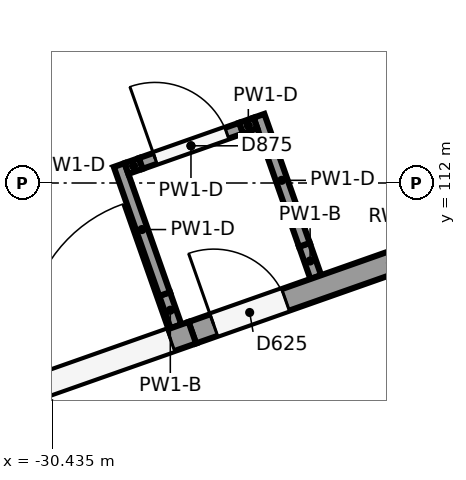
"""IFC4 building model, lengths in metres.
Left out: names, types, materials, properties, quantities, classifications, styles, units other than length and angle.
Written with IfcOpenShell. Run it as: python <this file> out.ifc"""

import sys

from ifc_helpers import new_model, si_unit, direction, frame, frame_2d, origin, place, context, subcontext, project, spatial, rectangle, extrude, element, fill, save


model = new_model("IFC4")
c1 = context("Model", 3, precision=1e-05, world=origin(), true_north=direction((0.0, 1.0)))
c2 = subcontext(c1, "Body", "Model", "MODEL_VIEW")
j1 = project(units=[si_unit("LENGTHUNIT", "METRE"), si_unit("PLANEANGLEUNIT", "RADIAN")], contexts=[c1])
p1 = place(None, origin())
s1 = spatial("IfcSite", under=j1, at=p1, CompositionType="ELEMENT")
p2 = place(p1, origin())
s2 = spatial("IfcBuilding", under=s1, at=p2, CompositionType="ELEMENT")
p3 = place(p2, origin())
s3 = spatial("IfcBuildingStorey", under=s2, at=p3, CompositionType="ELEMENT", Elevation=0.0)
p4 = place(p3, frame((-32.742, 108.569, 0.0), z_axis=(0.0, 0.0, 1.0), x_axis=(0.943210364758, 0.332196038226, 0.0)))
e1 = element("IfcWall", 1, at=p4, inside=s3, PredefinedType="SOLIDWALL", context=c2, shape_type="SweptSolid", body=[
    extrude(rectangle(XDim=4.4, YDim=0.3, at=frame_2d((2.2, 0.0))), origin(), (0.0, 0.0, 1.0), 4.85),
])
p5 = place(p4, frame((0.3, 0.0, 0.0)))
e2 = element("IfcOpeningElement", 2, at=p5, cuts=e1, PredefinedType="OPENING", context=c2, shape_type="SweptSolid", body=[
    extrude(rectangle(XDim=3.8, YDim=2.8, at=frame_2d((1.9, 1.4))), frame((0.0, 0.16, 0.0), z_axis=(0.0, -1.0, 0.0), x_axis=(1.0, 0.0, 0.0)), (0.0, 0.0, 1.0), 0.32),
])
p6 = place(p3, frame((-28.592, 110.031, 0.0), z_axis=(0.0, 0.0, 1.0), x_axis=(0.943213513301, 0.332187098373, 0.0)))
e3 = element("IfcWall", 3, at=p6, inside=s3, PredefinedType="SOLIDWALL", context=c2, shape_type="SweptSolid", body=[
    extrude(rectangle(XDim=5.528, YDim=0.3, at=frame_2d((2.764, 0.0))), origin(), (0.0, 0.0, 1.0), 4.85),
])
p7 = place(p6, frame((0.3, 0.0, 0.0)))
e4 = element("IfcOpeningElement", 4, at=p7, cuts=e3, PredefinedType="OPENING", context=c2, shape_type="SweptSolid", body=[
    extrude(rectangle(XDim=1.0, YDim=2.1, at=frame_2d((0.5, 1.05))), frame((0.0, 0.16, 0.0), z_axis=(0.0, -1.0, 0.0), x_axis=(1.0, 0.0, 0.0)), (0.0, 0.0, 1.0), 0.32),
])
p8 = place(p3, frame((-28.806, 110.114, 0.0), z_axis=(0.0, 0.0, 1.0), x_axis=(-0.332621430713, 0.943060434877, 0.0)))
e5 = element("IfcWall", 5, at=p8, inside=s3, PredefinedType="PARTITIONING", context=c2, shape_type="SweptSolid", body=[
    extrude(rectangle(XDim=0.45, YDim=0.15, at=frame_2d((0.225, 0.0))), origin(), (0.0, 0.0, 1.0), 4.85),
])
p9 = place(p3, frame((-28.956, 110.539, 0.0), z_axis=(0.0, 0.0, 1.0), x_axis=(-0.332174408782, 0.943217982308, 0.0)))
e6 = element("IfcWall", 6, at=p9, inside=s3, PredefinedType="PARTITIONING", context=c2, shape_type="SweptSolid", body=[
    extrude(rectangle(XDim=1.8, YDim=0.15, at=frame_2d((0.9, 0.0))), origin(), (0.0, 0.0, 1.0), 6.1),
])
p10 = place(p3, frame((-26.967, 110.762, 0.0), z_axis=(0.0, 0.0, 1.0), x_axis=(-0.332138720672, 0.943230549882, 0.0)))
e7 = element("IfcWall", 7, at=p10, inside=s3, PredefinedType="PARTITIONING", context=c2, shape_type="SweptSolid", body=[
    extrude(rectangle(XDim=0.45, YDim=0.15, at=frame_2d((0.225, 0.0))), origin(), (0.0, 0.0, 1.0), 4.85),
])
p11 = place(p3, frame((-27.117, 111.186, 0.0), z_axis=(0.0, 0.0, 1.0), x_axis=(-0.332174408782, 0.943217982308, 0.0)))
e8 = element("IfcWall", 8, at=p11, inside=s3, PredefinedType="PARTITIONING", context=c2, shape_type="SweptSolid", body=[
    extrude(rectangle(XDim=1.8, YDim=0.15, at=frame_2d((0.9, 0.0))), origin(), (0.0, 0.0, 1.0), 6.1),
])
p12 = place(p3, frame((-29.458, 112.191, 0.0), z_axis=(0.0, 0.0, 1.0), x_axis=(0.94330531524, 0.331926320498, 0.0)))
e9 = element("IfcWall", 9, at=p12, inside=s3, PredefinedType="PARTITIONING", context=c2, shape_type="SweptSolid", body=[
    extrude(rectangle(XDim=0.2, YDim=0.15, at=frame_2d((0.1, 0.0))), origin(), (0.0, 0.0, 1.0), 6.1),
])
p13 = place(p3, frame((-29.27, 112.257, 0.0), z_axis=(0.0, 0.0, 1.0), x_axis=(0.943247651759, 0.332090149584, 0.0)))
e10 = element("IfcWall", 10, at=p13, inside=s3, PredefinedType="PARTITIONING", context=c2, shape_type="SweptSolid", body=[
    extrude(rectangle(XDim=1.4, YDim=0.15, at=frame_2d((0.7, 0.0))), origin(), (0.0, 0.0, 1.0), 6.1),
])
p14 = place(p13, frame((0.2, 0.0, 0.0)))
e11 = element("IfcOpeningElement", 11, at=p14, cuts=e10, PredefinedType="OPENING", context=c2, shape_type="SweptSolid", body=[
    extrude(rectangle(XDim=1.0, YDim=2.1, at=frame_2d((0.5, 1.05))), frame((0.0, 0.085, 0.0), z_axis=(0.0, -1.0, 0.0), x_axis=(1.0, 0.0, 0.0)), (0.0, 0.0, 1.0), 0.17),
])
p15 = place(p3, frame((-27.949, 112.722, 0.0), z_axis=(0.0, 0.0, 1.0), x_axis=(0.942922754758, 0.333011529171, 0.0)))
e12 = element("IfcWall", 12, at=p15, inside=s3, PredefinedType="PARTITIONING", context=c2, shape_type="SweptSolid", body=[
    extrude(rectangle(XDim=0.2, YDim=0.15, at=frame_2d((0.1, 0.0))), origin(), (0.0, 0.0, 1.0), 6.1),
])
p16 = place(p5, origin())
e13 = element("IfcDoor", 13, at=p16, inside=s3, OperationType="DOUBLE_DOOR_SINGLE_SWING", PredefinedType="DOOR", context=c2, shape_type="SweptSolid", body=[
    extrude(rectangle(XDim=3.8, YDim=2.8, at=frame_2d((1.9, 1.4))), frame((0.0, 0.025, 0.0), z_axis=(0.0, -1.0, 0.0), x_axis=(1.0, 0.0, 0.0)), (0.0, 0.0, 1.0), 0.05),
])
fill(e2, e13)
p17 = place(p7, origin())
e14 = element("IfcDoor", 14, at=p17, inside=s3, OperationType="SINGLE_SWING_LEFT", PredefinedType="DOOR", context=c2, shape_type="SweptSolid", body=[
    extrude(rectangle(XDim=1.0, YDim=2.1, at=frame_2d((0.5, 1.05))), frame((0.0, 0.025, 0.0), z_axis=(0.0, -1.0, 0.0), x_axis=(1.0, 0.0, 0.0)), (0.0, 0.0, 1.0), 0.05),
])
fill(e4, e14)
p18 = place(p14, origin())
e15 = element("IfcDoor", 15, at=p18, inside=s3, OperationType="SINGLE_SWING_LEFT", PredefinedType="DOOR", context=c2, shape_type="SweptSolid", body=[
    extrude(rectangle(XDim=1.0, YDim=2.1, at=frame_2d((0.5, 1.05))), frame((0.0, 0.025, 0.0), z_axis=(0.0, -1.0, 0.0), x_axis=(1.0, 0.0, 0.0)), (0.0, 0.0, 1.0), 0.05),
])
fill(e11, e15)
save(model, sys.argv[1])
